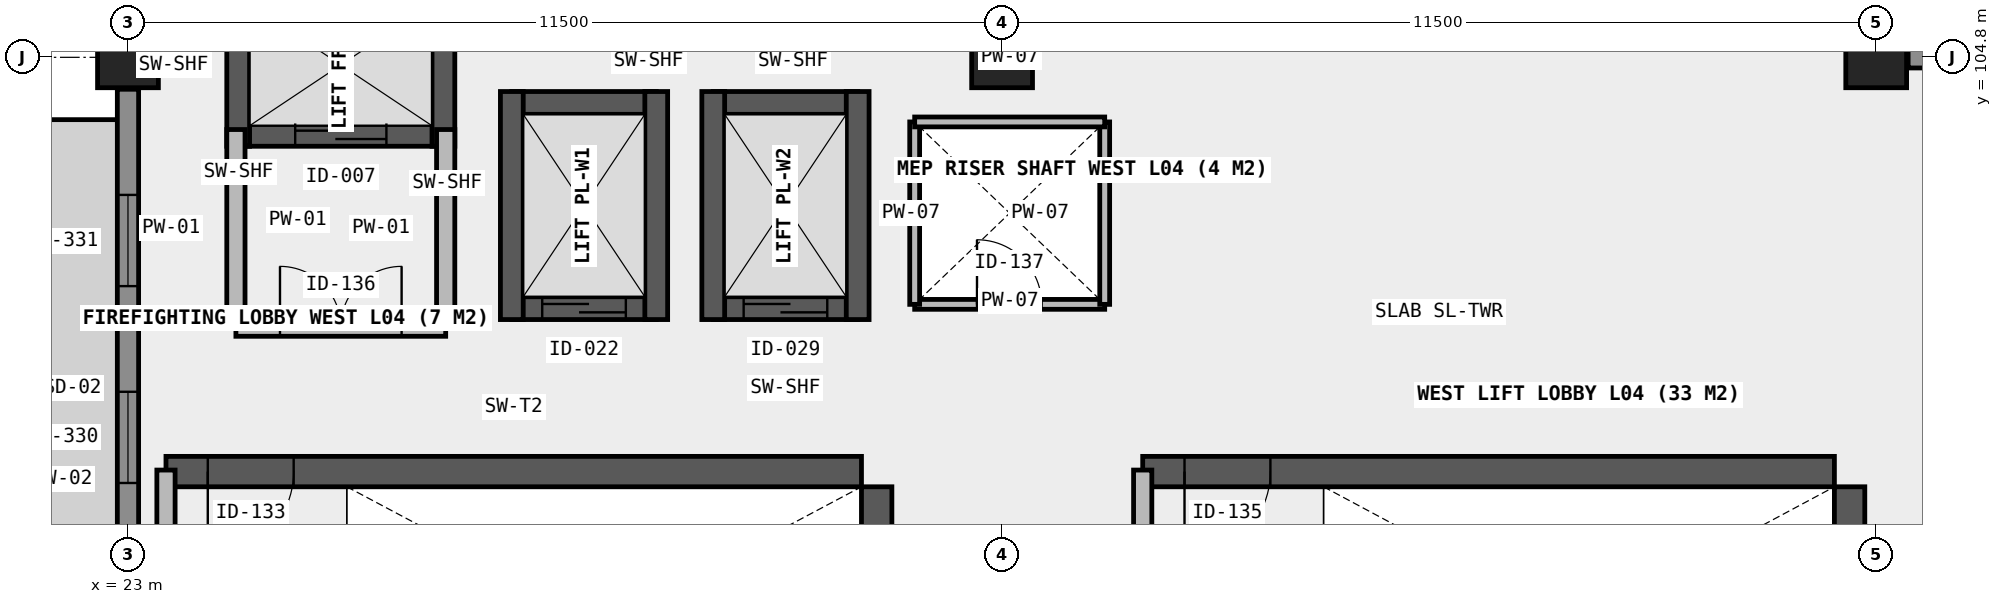
"""IFC4 building model, lengths in metres.
Left out: names, types, materials, properties, quantities, classifications, styles, units other than length and angle.
Written with IfcOpenShell. Run it as: python <this file> out.ifc"""

import sys

from ifc_helpers import new_model, si_unit, direction, frame, frame_2d, origin, origin_2d, place, context, subcontext, project, spatial, rectangle, extrude, element, fill, save


model = new_model("IFC4")
c1 = context("Model", 3, precision=1e-05, world=origin(), true_north=direction((0.0, 1.0)))
c2 = subcontext(c1, "Body", "Model", "MODEL_VIEW")
j1 = project(units=[si_unit("LENGTHUNIT", "METRE"), si_unit("PLANEANGLEUNIT", "RADIAN")], contexts=[c1])
p1 = place(None, origin())
s1 = spatial("IfcSite", under=j1, at=p1, CompositionType="ELEMENT")
p2 = place(p1, origin())
s2 = spatial("IfcBuilding", under=s1, at=p2, CompositionType="ELEMENT")
p3 = place(p2, frame((0.0, 0.0, 18.3)))
s3 = spatial("IfcBuildingStorey", under=s2, at=p3, CompositionType="ELEMENT", Elevation=18.3)
for number, where, z_axis, x_axis in (
    (1, (23.0, 104.8, 0.0), (0.0, 0.0, 1.0), (1.0, 0.0, 0.0)),
    (2, (34.5, 104.8, 0.0), (0.0, 0.0, 1.0), (1.0, 0.0, 0.0)),
    (3, (46.0, 104.8, 0.0), (0.0, 0.0, 1.0), (1.0, 0.0, 0.0)),
):
    element("IfcColumn", number, at=place(p3, frame(where, z_axis=z_axis, x_axis=x_axis)), inside=s3, PredefinedType="COLUMN", context=c2, shape_type="SweptSolid", body=[
        extrude(rectangle(XDim=0.8, YDim=0.8, at=origin_2d()), origin(), (0.0, 0.0, 1.0), 4.16),
    ])
p4 = place(p3, frame((24.45, 103.78, 0.0), z_axis=(0.0, 0.0, 1.0), x_axis=(1.0, 0.0, 0.0)))
e4 = element("IfcWall", 4, at=p4, inside=s3, PredefinedType="SHEAR", context=c2, shape_type="SweptSolid", body=[
    extrude(rectangle(XDim=2.7, YDim=0.3, at=frame_2d((1.35, 0.0))), origin(), (0.0, 0.0, 1.0), 4.0),
])
p5 = place(p4, frame((0.75, 0.0, 0.0)))
e5 = element("IfcOpeningElement", 5, at=p5, cuts=e4, PredefinedType="OPENING", context=c2, shape_type="SweptSolid", body=[
    extrude(rectangle(XDim=1.2, YDim=2.15, at=frame_2d((0.6, 1.075))), frame((0.0, 0.16, 0.0), z_axis=(0.0, -1.0, 0.0), x_axis=(1.0, 0.0, 0.0)), (0.0, 0.0, 1.0), 0.32),
])
for number, where, z_axis, x_axis in (
    (6, (24.45, 103.63, 0.0), (0.0, 0.0, 1.0), (0.0, 1.0, 0.0)),
    (7, (27.15, 103.63, 0.0), (0.0, 0.0, 1.0), (0.0, 1.0, 0.0)),
):
    element("IfcWall", number, at=place(p3, frame(where, z_axis=z_axis, x_axis=x_axis)), inside=s3, PredefinedType="SHEAR", context=c2, shape_type="SweptSolid", body=[
        extrude(rectangle(XDim=2.14, YDim=0.3, at=frame_2d((1.07, 0.0))), origin(), (0.0, 0.0, 1.0), 4.0),
    ])
p6 = place(p3, frame((28.05, 101.5, 0.0), z_axis=(0.0, 0.0, 1.0), x_axis=(1.0, 0.0, 0.0)))
e8 = element("IfcWall", 8, at=p6, inside=s3, PredefinedType="SHEAR", context=c2, shape_type="SweptSolid", body=[
    extrude(rectangle(XDim=1.9, YDim=0.3, at=frame_2d((0.95, 0.0))), origin(), (0.0, 0.0, 1.0), 4.0),
])
p7 = place(p6, frame((0.4, 0.0, 0.0)))
e9 = element("IfcOpeningElement", 9, at=p7, cuts=e8, PredefinedType="OPENING", context=c2, shape_type="SweptSolid", body=[
    extrude(rectangle(XDim=1.1, YDim=2.15, at=frame_2d((0.55, 1.075))), frame((0.0, 0.16, 0.0), z_axis=(0.0, -1.0, 0.0), x_axis=(1.0, 0.0, 0.0)), (0.0, 0.0, 1.0), 0.32),
])
p8 = place(p3, frame((28.05, 104.2, 0.0), z_axis=(0.0, 0.0, 1.0), x_axis=(1.0, 0.0, 0.0)))
e10 = element("IfcWall", 10, at=p8, inside=s3, PredefinedType="SHEAR", context=c2, shape_type="SweptSolid", body=[
    extrude(rectangle(XDim=1.9, YDim=0.3, at=frame_2d((0.95, 0.0))), origin(), (0.0, 0.0, 1.0), 4.0),
])
for number, where, z_axis, x_axis in (
    (11, (28.05, 101.35, 0.0), (0.0, 0.0, 1.0), (0.0, 1.0, 0.0)),
    (12, (29.95, 101.35, 0.0), (0.0, 0.0, 1.0), (0.0, 1.0, 0.0)),
):
    element("IfcWall", number, at=place(p3, frame(where, z_axis=z_axis, x_axis=x_axis)), inside=s3, PredefinedType="SHEAR", context=c2, shape_type="SweptSolid", body=[
        extrude(rectangle(XDim=3.0, YDim=0.3, at=frame_2d((1.5, 0.0))), origin(), (0.0, 0.0, 1.0), 4.0),
    ])
p9 = place(p3, frame((30.7, 101.5, 0.0), z_axis=(0.0, 0.0, 1.0), x_axis=(1.0, 0.0, 0.0)))
e13 = element("IfcWall", 13, at=p9, inside=s3, PredefinedType="SHEAR", context=c2, shape_type="SweptSolid", body=[
    extrude(rectangle(XDim=1.9, YDim=0.3, at=frame_2d((0.95, 0.0))), origin(), (0.0, 0.0, 1.0), 4.0),
])
p10 = place(p9, frame((0.4, 0.0, 0.0)))
e14 = element("IfcOpeningElement", 14, at=p10, cuts=e13, PredefinedType="OPENING", context=c2, shape_type="SweptSolid", body=[
    extrude(rectangle(XDim=1.1, YDim=2.15, at=frame_2d((0.55, 1.075))), frame((0.0, 0.16, 0.0), z_axis=(0.0, -1.0, 0.0), x_axis=(1.0, 0.0, 0.0)), (0.0, 0.0, 1.0), 0.32),
])
p11 = place(p3, frame((30.7, 104.2, 0.0), z_axis=(0.0, 0.0, 1.0), x_axis=(1.0, 0.0, 0.0)))
e15 = element("IfcWall", 15, at=p11, inside=s3, PredefinedType="SHEAR", context=c2, shape_type="SweptSolid", body=[
    extrude(rectangle(XDim=1.9, YDim=0.3, at=frame_2d((0.95, 0.0))), origin(), (0.0, 0.0, 1.0), 4.0),
])
for number, where, z_axis, x_axis in (
    (16, (30.7, 101.35, 0.0), (0.0, 0.0, 1.0), (0.0, 1.0, 0.0)),
    (17, (32.6, 101.35, 0.0), (0.0, 0.0, 1.0), (0.0, 1.0, 0.0)),
):
    element("IfcWall", number, at=place(p3, frame(where, z_axis=z_axis, x_axis=x_axis)), inside=s3, PredefinedType="SHEAR", context=c2, shape_type="SweptSolid", body=[
        extrude(rectangle(XDim=3.0, YDim=0.3, at=frame_2d((1.5, 0.0))), origin(), (0.0, 0.0, 1.0), 4.0),
    ])
p12 = place(p3, frame((23.5, 99.35, 0.0), z_axis=(0.0, 0.0, 1.0), x_axis=(1.0, 0.0, 0.0)))
e18 = element("IfcWall", 18, at=p12, inside=s3, PredefinedType="SHEAR", context=c2, shape_type="SweptSolid", body=[
    extrude(rectangle(XDim=9.15, YDim=0.4, at=frame_2d((4.575, 0.0))), origin(), (0.0, 0.0, 1.0), 4.16),
])
p13 = place(p12, frame((0.55, 0.0, 0.0)))
e19 = element("IfcOpeningElement", 19, at=p13, cuts=e18, PredefinedType="OPENING", context=c2, shape_type="SweptSolid", body=[
    extrude(rectangle(XDim=1.13, YDim=2.15, at=frame_2d((0.565, 1.075))), frame((0.0, 0.21, 0.0), z_axis=(0.0, -1.0, 0.0), x_axis=(1.0, 0.0, 0.0)), (0.0, 0.0, 1.0), 0.42),
])
p14 = place(p3, frame((32.85, 95.55, 0.0), z_axis=(0.0, 0.0, 1.0), x_axis=(0.0, 1.0, 0.0)))
e20 = element("IfcWall", 20, at=p14, inside=s3, PredefinedType="SHEAR", context=c2, shape_type="SweptSolid", body=[
    extrude(rectangle(XDim=3.6, YDim=0.4, at=frame_2d((1.8, 0.0))), origin(), (0.0, 0.0, 1.0), 4.16),
])
p15 = place(p3, frame((36.35, 99.35, 0.0), z_axis=(0.0, 0.0, 1.0), x_axis=(1.0, 0.0, 0.0)))
e21 = element("IfcWall", 21, at=p15, inside=s3, PredefinedType="SHEAR", context=c2, shape_type="SweptSolid", body=[
    extrude(rectangle(XDim=9.1, YDim=0.4, at=frame_2d((4.55, 0.0))), origin(), (0.0, 0.0, 1.0), 4.16),
])
p16 = place(p15, frame((0.55, 0.0, 0.0)))
e22 = element("IfcOpeningElement", 22, at=p16, cuts=e21, PredefinedType="OPENING", context=c2, shape_type="SweptSolid", body=[
    extrude(rectangle(XDim=1.13, YDim=2.15, at=frame_2d((0.565, 1.075))), frame((0.0, 0.21, 0.0), z_axis=(0.0, -1.0, 0.0), x_axis=(1.0, 0.0, 0.0)), (0.0, 0.0, 1.0), 0.42),
])
p17 = place(p3, frame((45.65, 95.22, 0.0), z_axis=(0.0, 0.0, 1.0), x_axis=(0.0, 1.0, 0.0)))
e23 = element("IfcWall", 23, at=p17, inside=s3, PredefinedType="SHEAR", context=c2, shape_type="SweptSolid", body=[
    extrude(rectangle(XDim=3.93, YDim=0.4, at=frame_2d((1.965, 0.0))), origin(), (0.0, 0.0, 1.0), 4.16),
])
p18 = place(p3, frame((46.42, 104.8, 0.0), z_axis=(0.0, 0.0, 1.0), x_axis=(1.0, 0.0, 0.0)))
e24 = element("IfcWall", 24, at=p18, inside=s3, PredefinedType="SOLIDWALL", context=c2, shape_type="SweptSolid", body=[
    extrude(rectangle(XDim=10.66, YDim=0.28, at=frame_2d((5.33, 0.0))), origin(), (0.0, 0.0, 1.0), 3.1),
])
p19 = place(p18, frame((1.765, 0.0, 0.8)))
e25 = element("IfcOpeningElement", 25, at=p19, cuts=e24, PredefinedType="OPENING", context=c2, shape_type="SweptSolid", body=[
    extrude(rectangle(XDim=1.2, YDim=2.1, at=frame_2d((0.6, 1.05))), frame((0.0, 0.15, 0.0), z_axis=(0.0, -1.0, 0.0), x_axis=(1.0, 0.0, 0.0)), (0.0, 0.0, 1.0), 0.3),
])
p20 = place(p18, frame((4.73, 0.0, 0.8)))
e26 = element("IfcOpeningElement", 26, at=p20, cuts=e24, PredefinedType="OPENING", context=c2, shape_type="SweptSolid", body=[
    extrude(rectangle(XDim=1.2, YDim=2.1, at=frame_2d((0.6, 1.05))), frame((0.0, 0.15, 0.0), z_axis=(0.0, -1.0, 0.0), x_axis=(1.0, 0.0, 0.0)), (0.0, 0.0, 1.0), 0.3),
])
p21 = place(p18, frame((7.695, 0.0, 0.8)))
e27 = element("IfcOpeningElement", 27, at=p21, cuts=e24, PredefinedType="OPENING", context=c2, shape_type="SweptSolid", body=[
    extrude(rectangle(XDim=1.2, YDim=2.1, at=frame_2d((0.6, 1.05))), frame((0.0, 0.15, 0.0), z_axis=(0.0, -1.0, 0.0), x_axis=(1.0, 0.0, 0.0)), (0.0, 0.0, 1.0), 0.3),
])
p22 = place(p3, frame((23.0, 95.22, 0.0), z_axis=(0.0, 0.0, 1.0), x_axis=(0.0, 1.0, 0.0)))
e28 = element("IfcWall", 28, at=p22, inside=s3, PredefinedType="SOLIDWALL", context=c2, shape_type="SweptSolid", body=[
    extrude(rectangle(XDim=9.16, YDim=0.28, at=frame_2d((4.58, 0.0))), origin(), (0.0, 0.0, 1.0), 3.1),
])
p23 = place(p22, frame((1.39, 0.0, 0.8)))
e29 = element("IfcOpeningElement", 29, at=p23, cuts=e28, PredefinedType="OPENING", context=c2, shape_type="SweptSolid", body=[
    extrude(rectangle(XDim=1.2, YDim=2.1, at=frame_2d((0.6, 1.05))), frame((0.0, 0.15, 0.0), z_axis=(0.0, -1.0, 0.0), x_axis=(1.0, 0.0, 0.0)), (0.0, 0.0, 1.0), 0.3),
])
p24 = place(p22, frame((3.98, 0.0, 0.8)))
e30 = element("IfcOpeningElement", 30, at=p24, cuts=e28, PredefinedType="OPENING", context=c2, shape_type="SweptSolid", body=[
    extrude(rectangle(XDim=1.2, YDim=2.1, at=frame_2d((0.6, 1.05))), frame((0.0, 0.15, 0.0), z_axis=(0.0, -1.0, 0.0), x_axis=(1.0, 0.0, 0.0)), (0.0, 0.0, 1.0), 0.3),
])
p25 = place(p22, frame((6.57, 0.0, 0.8)))
e31 = element("IfcOpeningElement", 31, at=p25, cuts=e28, PredefinedType="OPENING", context=c2, shape_type="SweptSolid", body=[
    extrude(rectangle(XDim=1.2, YDim=2.1, at=frame_2d((0.6, 1.05))), frame((0.0, 0.15, 0.0), z_axis=(0.0, -1.0, 0.0), x_axis=(1.0, 0.0, 0.0)), (0.0, 0.0, 1.0), 0.3),
])
p26 = place(p3, frame((23.5, 95.33, 0.0), z_axis=(0.0, 0.0, 1.0), x_axis=(0.0, 1.0, 0.0)))
e32 = element("IfcWall", 32, at=p26, inside=s3, PredefinedType="SOLIDWALL", context=c2, shape_type="SweptSolid", body=[
    extrude(rectangle(XDim=4.04, YDim=0.24, at=frame_2d((2.02, 0.0))), origin(), (0.0, 0.0, 1.0), 3.88),
])
p27 = place(p26, frame((1.45, 0.0, 0.0)))
e33 = element("IfcOpeningElement", 33, at=p27, cuts=e32, PredefinedType="OPENING", context=c2, shape_type="SweptSolid", body=[
    extrude(rectangle(XDim=1.13, YDim=2.15, at=frame_2d((0.565, 1.075))), frame((0.0, 0.13, 0.0), z_axis=(0.0, -1.0, 0.0), x_axis=(1.0, 0.0, 0.0)), (0.0, 0.0, 1.0), 0.26),
])
p28 = place(p3, frame((36.35, 95.33, 0.0), z_axis=(0.0, 0.0, 1.0), x_axis=(0.0, 1.0, 0.0)))
e34 = element("IfcWall", 34, at=p28, inside=s3, PredefinedType="SOLIDWALL", context=c2, shape_type="SweptSolid", body=[
    extrude(rectangle(XDim=4.04, YDim=0.24, at=frame_2d((2.02, 0.0))), origin(), (0.0, 0.0, 1.0), 3.88),
])
p29 = place(p28, frame((1.45, 0.0, 0.0)))
e35 = element("IfcOpeningElement", 35, at=p29, cuts=e34, PredefinedType="OPENING", context=c2, shape_type="SweptSolid", body=[
    extrude(rectangle(XDim=1.13, YDim=2.15, at=frame_2d((0.565, 1.075))), frame((0.0, 0.13, 0.0), z_axis=(0.0, -1.0, 0.0), x_axis=(1.0, 0.0, 0.0)), (0.0, 0.0, 1.0), 0.26),
])
p30 = place(p3, frame((24.42, 101.25, 0.0), z_axis=(0.0, 0.0, 1.0), x_axis=(1.0, 0.0, 0.0)))
e36 = element("IfcWall", 36, at=p30, inside=s3, PredefinedType="SOLIDWALL", context=c2, shape_type="SweptSolid", body=[
    extrude(rectangle(XDim=2.76, YDim=0.24, at=frame_2d((1.38, 0.0))), origin(), (0.0, 0.0, 1.0), 3.88),
])
p31 = place(p30, frame((0.58, 0.0, 0.0)))
e37 = element("IfcOpeningElement", 37, at=p31, cuts=e36, PredefinedType="OPENING", context=c2, shape_type="SweptSolid", body=[
    extrude(rectangle(XDim=1.6, YDim=2.15, at=frame_2d((0.8, 1.075))), frame((0.0, 0.13, 0.0), z_axis=(0.0, -1.0, 0.0), x_axis=(1.0, 0.0, 0.0)), (0.0, 0.0, 1.0), 0.26),
])
for number, where, z_axis, x_axis in (
    (38, (24.42, 101.25, 0.0), (0.0, 0.0, 1.0), (0.0, 1.0, 0.0)),
    (39, (27.18, 101.25, 0.0), (0.0, 0.0, 1.0), (0.0, 1.0, 0.0)),
):
    element("IfcWall", number, at=place(p3, frame(where, z_axis=z_axis, x_axis=x_axis)), inside=s3, PredefinedType="SOLIDWALL", context=c2, shape_type="SweptSolid", body=[
        extrude(rectangle(XDim=2.6, YDim=0.24, at=frame_2d((1.3, 0.0))), origin(), (0.0, 0.0, 1.0), 3.88),
    ])
p32 = place(p3, frame((33.35, 101.55, 0.0), z_axis=(0.0, 0.0, 1.0), x_axis=(1.0, 0.0, 0.0)))
e40 = element("IfcWall", 40, at=p32, inside=s3, PredefinedType="PLUMBINGWALL", context=c2, shape_type="SweptSolid", body=[
    extrude(rectangle(XDim=2.5, YDim=0.13, at=frame_2d((1.25, 0.0))), origin(), (0.0, 0.0, 1.0), 3.88),
])
p33 = place(p32, frame((0.82, 0.0, 0.0)))
e41 = element("IfcOpeningElement", 41, at=p33, cuts=e40, PredefinedType="OPENING", context=c2, shape_type="SweptSolid", body=[
    extrude(rectangle(XDim=0.85, YDim=2.0, at=frame_2d((0.425, 1.0))), frame((0.0, 0.075, 0.0), z_axis=(0.0, -1.0, 0.0), x_axis=(1.0, 0.0, 0.0)), (0.0, 0.0, 1.0), 0.15),
])
for number, where, z_axis, x_axis in (
    (42, (33.35, 101.55, 0.0), (0.0, 0.0, 1.0), (0.0, 1.0, 0.0)),
    (43, (35.85, 101.55, 0.0), (0.0, 0.0, 1.0), (0.0, 1.0, 0.0)),
):
    element("IfcWall", number, at=place(p3, frame(where, z_axis=z_axis, x_axis=x_axis)), inside=s3, PredefinedType="PLUMBINGWALL", context=c2, shape_type="SweptSolid", body=[
        extrude(rectangle(XDim=2.4, YDim=0.13, at=frame_2d((1.2, 0.0))), origin(), (0.0, 0.0, 1.0), 3.88),
    ])
p34 = place(p3, frame((33.35, 103.95, 0.0), z_axis=(0.0, 0.0, 1.0), x_axis=(1.0, 0.0, 0.0)))
e44 = element("IfcWall", 44, at=p34, inside=s3, PredefinedType="PLUMBINGWALL", context=c2, shape_type="SweptSolid", body=[
    extrude(rectangle(XDim=2.5, YDim=0.13, at=frame_2d((1.25, 0.0))), origin(), (0.0, 0.0, 1.0), 3.88),
])
p35 = place(p24, origin())
e45 = element("IfcWindow", 45, at=p35, inside=s3, PartitioningType="SINGLE_PANEL", PredefinedType="WINDOW", context=c2, shape_type="SweptSolid", body=[
    extrude(rectangle(XDim=1.2, YDim=2.1, at=frame_2d((0.6, 1.05))), frame((0.0, 0.03, 0.0), z_axis=(0.0, -1.0, 0.0), x_axis=(1.0, 0.0, 0.0)), (0.0, 0.0, 1.0), 0.06),
])
fill(e30, e45)
p36 = place(p25, origin())
e46 = element("IfcWindow", 46, at=p36, inside=s3, PartitioningType="SINGLE_PANEL", PredefinedType="WINDOW", context=c2, shape_type="SweptSolid", body=[
    extrude(rectangle(XDim=1.2, YDim=2.1, at=frame_2d((0.6, 1.05))), frame((0.0, 0.03, 0.0), z_axis=(0.0, -1.0, 0.0), x_axis=(1.0, 0.0, 0.0)), (0.0, 0.0, 1.0), 0.06),
])
fill(e31, e46)
p37 = place(p5, origin())
e47 = element("IfcDoor", 47, at=p37, inside=s3, OperationType="SLIDING_TO_RIGHT", PredefinedType="DOOR", context=c2, shape_type="SweptSolid", body=[
    extrude(rectangle(XDim=1.2, YDim=2.15, at=frame_2d((0.6, 1.075))), frame((0.0, 0.025, 0.0), z_axis=(0.0, -1.0, 0.0), x_axis=(1.0, 0.0, 0.0)), (0.0, 0.0, 1.0), 0.05),
])
fill(e5, e47)
p38 = place(p7, origin())
e48 = element("IfcDoor", 48, at=p38, inside=s3, OperationType="SLIDING_TO_LEFT", PredefinedType="DOOR", context=c2, shape_type="SweptSolid", body=[
    extrude(rectangle(XDim=1.1, YDim=2.15, at=frame_2d((0.55, 1.075))), frame((0.0, 0.025, 0.0), z_axis=(0.0, -1.0, 0.0), x_axis=(1.0, 0.0, 0.0)), (0.0, 0.0, 1.0), 0.05),
])
fill(e9, e48)
p39 = place(p10, origin())
e49 = element("IfcDoor", 49, at=p39, inside=s3, OperationType="SLIDING_TO_LEFT", PredefinedType="DOOR", context=c2, shape_type="SweptSolid", body=[
    extrude(rectangle(XDim=1.1, YDim=2.15, at=frame_2d((0.55, 1.075))), frame((0.0, 0.025, 0.0), z_axis=(0.0, -1.0, 0.0), x_axis=(1.0, 0.0, 0.0)), (0.0, 0.0, 1.0), 0.05),
])
fill(e14, e49)
p40 = place(p13, frame((0.565, 0.0, 0.0), z_axis=(0.0, 0.0, 1.0), x_axis=(-1.0, 0.0, 0.0)))
e50 = element("IfcDoor", 50, at=p40, inside=s3, OperationType="SINGLE_SWING_LEFT", PredefinedType="DOOR", context=c2, shape_type="SweptSolid", body=[
    extrude(rectangle(XDim=1.13, YDim=2.15, at=frame_2d((0.0, 1.075))), frame((0.0, 0.025, 0.0), z_axis=(0.0, -1.0, 0.0), x_axis=(1.0, 0.0, 0.0)), (0.0, 0.0, 1.0), 0.05),
])
fill(e19, e50)
p41 = place(p16, frame((0.565, 0.0, 0.0), z_axis=(0.0, 0.0, 1.0), x_axis=(-1.0, 0.0, 0.0)))
e51 = element("IfcDoor", 51, at=p41, inside=s3, OperationType="SINGLE_SWING_LEFT", PredefinedType="DOOR", context=c2, shape_type="SweptSolid", body=[
    extrude(rectangle(XDim=1.13, YDim=2.15, at=frame_2d((0.0, 1.075))), frame((0.0, 0.025, 0.0), z_axis=(0.0, -1.0, 0.0), x_axis=(1.0, 0.0, 0.0)), (0.0, 0.0, 1.0), 0.05),
])
fill(e22, e51)
p42 = place(p31, origin())
e52 = element("IfcDoor", 52, at=p42, inside=s3, OperationType="DOUBLE_DOOR_SINGLE_SWING", PredefinedType="DOOR", context=c2, shape_type="SweptSolid", body=[
    extrude(rectangle(XDim=1.6, YDim=2.15, at=frame_2d((0.8, 1.075))), frame((0.0, 0.025, 0.0), z_axis=(0.0, -1.0, 0.0), x_axis=(1.0, 0.0, 0.0)), (0.0, 0.0, 1.0), 0.05),
])
fill(e37, e52)
p43 = place(p33, origin())
e53 = element("IfcDoor", 53, at=p43, inside=s3, OperationType="SINGLE_SWING_LEFT", PredefinedType="TRAPDOOR", context=c2, shape_type="SweptSolid", body=[
    extrude(rectangle(XDim=0.85, YDim=2.0, at=frame_2d((0.425, 1.0))), frame((0.0, 0.025, 0.0), z_axis=(0.0, -1.0, 0.0), x_axis=(1.0, 0.0, 0.0)), (0.0, 0.0, 1.0), 0.05),
])
fill(e41, e53)
save(model, sys.argv[1])
